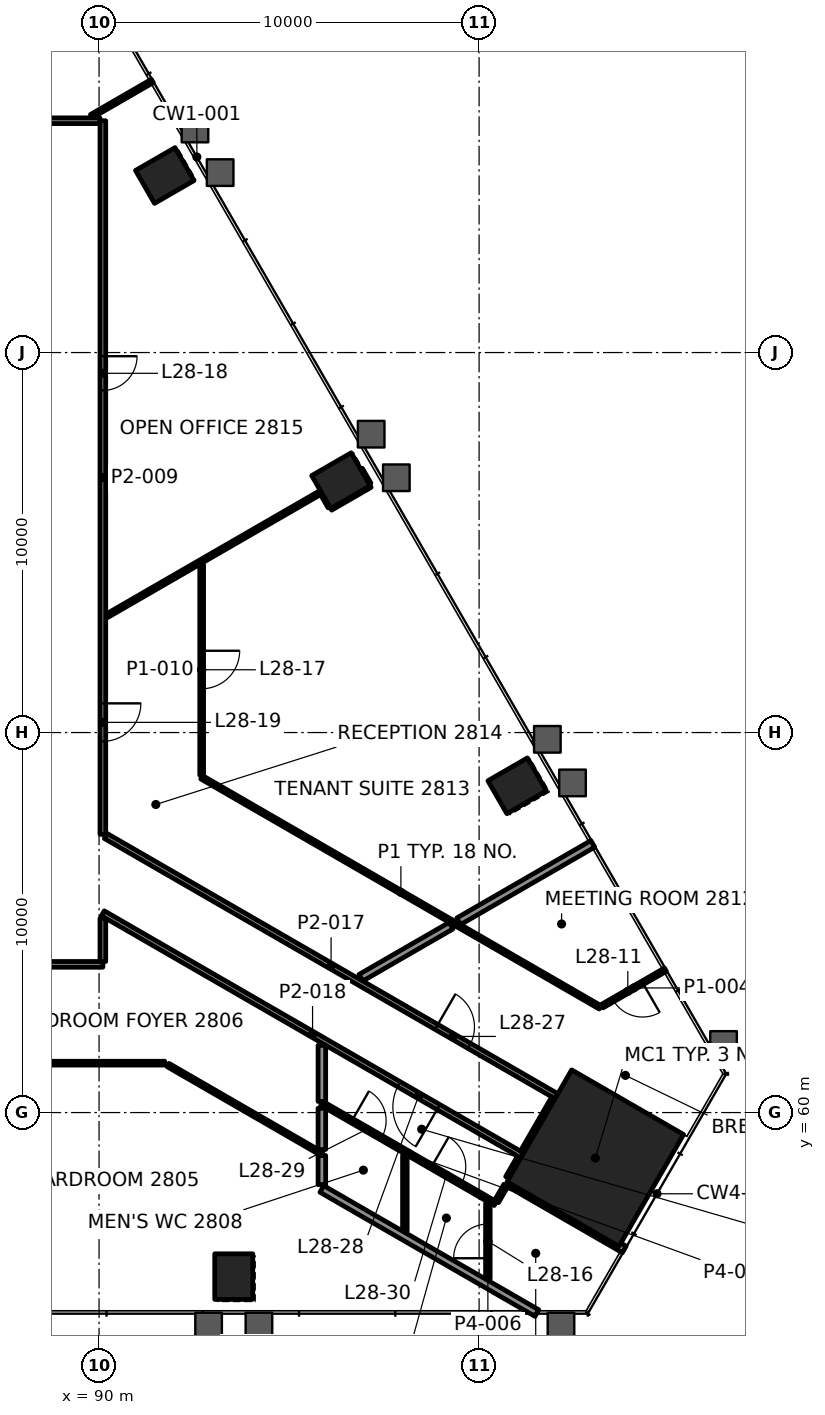
"""IFC4 building model, lengths in metres.
Left out: names, types, materials, properties, quantities, classifications, styles, units other than length and angle.
Written with IfcOpenShell. Run it as: python <this file> out.ifc"""

import sys

from ifc_helpers import new_model, si_unit, direction, frame, frame_2d, origin, origin_2d, place, context, subcontext, project, spatial, rectangle, extrude, element, fill, save


model = new_model("IFC4")
c1 = context("Model", 3, precision=1e-05, world=origin(), true_north=direction((0.0, 1.0)))
c2 = subcontext(c1, "Body", "Model", "MODEL_VIEW")
j1 = project(units=[si_unit("LENGTHUNIT", "METRE"), si_unit("PLANEANGLEUNIT", "RADIAN")], contexts=[c1])
p1 = place(None, origin())
s1 = spatial("IfcSite", under=j1, at=p1, CompositionType="ELEMENT")
p2 = place(p1, origin())
s2 = spatial("IfcBuilding", under=s1, at=p2, CompositionType="ELEMENT")
p3 = place(p2, frame((0.0, 0.0, 124.0)))
s3 = spatial("IfcBuildingStorey", under=s2, at=p3, CompositionType="ELEMENT", Elevation=124.0)
p4 = place(p3, frame((103.058, 58.801, 0.0), z_axis=(0.0, 0.0, 1.0), x_axis=(0.5, 0.866025403784, 0.0)))
e1 = element("IfcColumn", 1, at=p4, inside=s3, PredefinedType="COLUMN", context=c2, shape_type="SweptSolid", body=[
    extrude(rectangle(XDim=3.4, YDim=3.4, at=origin_2d()), origin(), (0.0, 0.0, 1.0), 4.2),
])
for number, where, z_axis, x_axis in (
    (2, (93.545, 55.683, -0.0), (0.0, 0.0, 1.0), (1.0, 0.0, 0.0)),
    (3, (101.001, 68.598, -0.0), (0.0, 0.0, 1.0), (-0.5, 0.866, 0.0)),
    (4, (96.365, 76.628, -0.0), (0.0, 0.0, 1.0), (-0.5, 0.866, 0.0)),
    (5, (91.729, 84.658, -0.0), (0.0, 0.0, 1.0), (-0.5, 0.866, 0.0)),
):
    element("IfcColumn", number, at=place(p3, frame(where, z_axis=z_axis, x_axis=x_axis)), inside=s3, PredefinedType="COLUMN", context=c2, shape_type="SweptSolid", body=[
        extrude(rectangle(XDim=1.0, YDim=1.2, at=origin_2d()), origin(), (0.0, 0.0, 1.0), 4.2),
    ])
p5 = place(p3, frame((63.41, 61.3, 0.0), z_axis=(0.0, 0.0, 1.0), x_axis=(1.0, 0.0, 0.0)))
e6 = element("IfcWall", 6, at=p5, inside=s3, PredefinedType="PARTITIONING", context=c2, shape_type="SweptSolid", body=[
    extrude(rectangle(XDim=28.319, YDim=0.1, at=frame_2d((14.16, 0.0))), origin(), (0.0, 0.0, 1.0), 3.4),
])
p6 = place(p5, frame((7.613, 0.0, 0.0)))
e7 = element("IfcOpeningElement", 7, at=p6, cuts=e6, PredefinedType="OPENING", context=c2, shape_type="SweptSolid", body=[
    extrude(rectangle(XDim=1.2, YDim=2.1, at=frame_2d((0.6, 1.05))), frame((0.0, 0.06, 0.0), z_axis=(0.0, -1.0, 0.0), x_axis=(1.0, 0.0, 0.0)), (0.0, 0.0, 1.0), 0.12),
])
p7 = place(p5, frame((21.573, 0.0, 0.0)))
e8 = element("IfcOpeningElement", 8, at=p7, cuts=e6, PredefinedType="OPENING", context=c2, shape_type="SweptSolid", body=[
    extrude(rectangle(XDim=1.2, YDim=2.1, at=frame_2d((0.6, 1.05))), frame((0.0, 0.06, 0.0), z_axis=(0.0, -1.0, 0.0), x_axis=(1.0, 0.0, 0.0)), (0.0, 0.0, 1.0), 0.12),
])
p8 = place(p3, frame((90.1, 63.9, 0.0), z_axis=(0.0, 0.0, 1.0), x_axis=(-1.0, 0.0, 0.0)))
e9 = element("IfcWall", 9, at=p8, inside=s3, PredefinedType="PARTITIONING", context=c2, shape_type="SweptSolid", body=[
    extrude(rectangle(XDim=30.2, YDim=0.15, at=frame_2d((15.1, 0.0))), origin(), (0.0, 0.0, 1.0), 3.4),
])
p9 = place(p8, frame((4.833, 0.0, 0.0)))
e10 = element("IfcOpeningElement", 10, at=p9, cuts=e9, PredefinedType="OPENING", context=c2, shape_type="SweptSolid", body=[
    extrude(rectangle(XDim=1.0, YDim=2.1, at=frame_2d((0.5, 1.05))), frame((0.0, 0.085, 0.0), z_axis=(0.0, -1.0, 0.0), x_axis=(1.0, 0.0, 0.0)), (0.0, 0.0, 1.0), 0.17),
])
p10 = place(p8, frame((18.077, 0.0, 0.0)))
e11 = element("IfcOpeningElement", 11, at=p10, cuts=e9, PredefinedType="OPENING", context=c2, shape_type="SweptSolid", body=[
    extrude(rectangle(XDim=1.0, YDim=2.1, at=frame_2d((0.5, 1.05))), frame((0.0, 0.085, 0.0), z_axis=(0.0, -1.0, 0.0), x_axis=(1.0, 0.0, 0.0)), (0.0, 0.0, 1.0), 0.17),
])
p11 = place(p8, frame((27.893, 0.0, 0.0)))
e12 = element("IfcOpeningElement", 12, at=p11, cuts=e9, PredefinedType="OPENING", context=c2, shape_type="SweptSolid", body=[
    extrude(rectangle(XDim=0.9, YDim=2.1, at=frame_2d((0.45, 1.05))), frame((0.0, 0.085, 0.0), z_axis=(0.0, -1.0, 0.0), x_axis=(1.0, 0.0, 0.0)), (0.0, 0.0, 1.0), 0.17),
])
p12 = place(p3, frame((80.375, 86.1, 0.0), z_axis=(0.0, 0.0, 1.0), x_axis=(1.0, 0.0, 0.0)))
e13 = element("IfcWall", 13, at=p12, inside=s3, PredefinedType="PARTITIONING", context=c2, shape_type="SweptSolid", body=[
    extrude(rectangle(XDim=9.649, YDim=0.15, at=frame_2d((4.825, 0.0))), origin(), (0.0, 0.0, 1.0), 3.4),
])
p13 = place(p12, frame((4.11, 0.0, 0.0)))
e14 = element("IfcOpeningElement", 14, at=p13, cuts=e13, PredefinedType="OPENING", context=c2, shape_type="SweptSolid", body=[
    extrude(rectangle(XDim=1.2, YDim=2.1, at=frame_2d((0.6, 1.05))), frame((0.0, 0.085, 0.0), z_axis=(0.0, -1.0, 0.0), x_axis=(1.0, 0.0, 0.0)), (0.0, 0.0, 1.0), 0.17),
])
p14 = place(p3, frame((104.903, 63.761, 0.0), z_axis=(0.0, 0.0, 1.0), x_axis=(-0.86605048973, -0.49995654735, 0.0)))
e15 = element("IfcWall", 15, at=p14, inside=s3, PredefinedType="PARTITIONING", context=c2, shape_type="SweptSolid", body=[
    extrude(rectangle(XDim=1.926, YDim=0.1, at=frame_2d((0.963, 0.0))), origin(), (0.0, 0.0, 1.0), 3.4),
])
p15 = place(p14, frame((0.693, 0.0, 0.0)))
e16 = element("IfcOpeningElement", 16, at=p15, cuts=e15, PredefinedType="OPENING", context=c2, shape_type="SweptSolid", body=[
    extrude(rectangle(XDim=0.9, YDim=2.1, at=frame_2d((0.45, 1.05))), frame((0.0, 0.06, 0.0), z_axis=(0.0, -1.0, 0.0), x_axis=(1.0, 0.0, 0.0)), (0.0, 0.0, 1.0), 0.12),
])
p16 = place(p3, frame((96.89, 63.548, 0.0), z_axis=(0.0, 0.0, 1.0), x_axis=(0.86604168154, 0.499971805041, 0.0)))
e17 = element("IfcWall", 17, at=p16, inside=s3, PredefinedType="PARTITIONING", context=c2, shape_type="SweptSolid", body=[
    extrude(rectangle(XDim=2.74, YDim=0.2, at=frame_2d((1.37, 0.0))), origin(), (0.0, 0.0, 1.0), 3.4),
])
p17 = place(p3, frame((96.096, 75.896, 0.0), z_axis=(0.0, 0.0, 1.0), x_axis=(0.865978732077, 0.500080829057, 0.0)))
e18 = element("IfcWall", 18, at=p17, inside=s3, PredefinedType="PARTITIONING", context=c2, shape_type="SweptSolid", body=[
    extrude(rectangle(XDim=1.199, YDim=0.1, at=frame_2d((0.6, 0.0))), origin(), (0.0, 0.0, 1.0), 3.165),
])
p18 = place(p3, frame((90.201, 73.07, 0.0), z_axis=(0.0, 0.0, 1.0), x_axis=(0.866021525041, 0.500006718121, 0.0)))
e19 = element("IfcWall", 19, at=p18, inside=s3, PredefinedType="PARTITIONING", context=c2, shape_type="SweptSolid", body=[
    extrude(rectangle(XDim=6.518, YDim=0.1, at=frame_2d((3.259, 0.0))), origin(), (0.0, 0.0, 1.0), 3.4),
])
p19 = place(p3, frame((89.797, 86.22, 0.0), z_axis=(0.0, 0.0, 1.0), x_axis=(0.866036320872, 0.499981090573, 0.0)))
e20 = element("IfcWall", 20, at=p19, inside=s3, PredefinedType="PARTITIONING", context=c2, shape_type="SweptSolid", body=[
    extrude(rectangle(XDim=1.852, YDim=0.1, at=frame_2d((0.926, 0.0))), origin(), (0.0, 0.0, 1.0), 3.165),
])
p20 = place(p3, frame((100.458, 57.658, 0.0), z_axis=(0.0, 0.0, 1.0), x_axis=(0.499895202697, 0.866085900082, 0.0)))
e21 = element("IfcWall", 21, at=p20, inside=s3, PredefinedType="PARTITIONING", context=c2, shape_type="SweptSolid", body=[
    extrude(rectangle(XDim=0.489, YDim=0.12, at=frame_2d((0.245, 0.0))), origin(), (0.0, 0.0, 1.0), 3.4),
])
p21 = place(p3, frame((100.786, 58.265, 0.0), z_axis=(0.0, 0.0, 1.0), x_axis=(0.499880341542, 0.866094477606, 0.0)))
e22 = element("IfcWall", 22, at=p21, inside=s3, PredefinedType="PARTITIONING", context=c2, shape_type="SweptSolid", body=[
    extrude(rectangle(XDim=0.625, YDim=0.2, at=frame_2d((0.312, 0.0))), origin(), (0.0, 0.0, 1.0), 3.4),
])
p22 = place(p3, frame((100.231, 55.623, 0.0), z_axis=(0.0, 0.0, 1.0), x_axis=(0.0, 1.0, 0.0)))
e23 = element("IfcWall", 23, at=p22, inside=s3, PredefinedType="PARTITIONING", context=c2, shape_type="SweptSolid", body=[
    extrude(rectangle(XDim=1.987, YDim=0.12, at=frame_2d((0.993, 0.0))), origin(), (0.0, 0.0, 1.0), 3.4),
])
p23 = place(p22, frame((0.543, 0.0, 0.0)))
e24 = element("IfcOpeningElement", 24, at=p23, cuts=e23, PredefinedType="OPENING", context=c2, shape_type="SweptSolid", body=[
    extrude(rectangle(XDim=0.9, YDim=2.1, at=frame_2d((0.45, 1.05))), frame((0.0, 0.07, 0.0), z_axis=(0.0, -1.0, 0.0), x_axis=(1.0, 0.0, 0.0)), (0.0, 0.0, 1.0), 0.14),
])
p24 = place(p3, frame((98.047, 56.884, 0.0), z_axis=(0.0, 0.0, 1.0), x_axis=(0.0, 1.0, 0.0)))
e25 = element("IfcWall", 25, at=p24, inside=s3, PredefinedType="PARTITIONING", context=c2, shape_type="SweptSolid", body=[
    extrude(rectangle(XDim=1.987, YDim=0.12, at=frame_2d((0.993, 0.0))), origin(), (0.0, 0.0, 1.0), 3.4),
])
p25 = place(p3, frame((95.863, 58.105, 0.0), z_axis=(0.0, 0.0, 1.0), x_axis=(0.0, 1.0, 0.0)))
e26 = element("IfcWall", 26, at=p25, inside=s3, PredefinedType="PARTITIONING", context=c2, shape_type="SweptSolid", body=[
    extrude(rectangle(XDim=0.765, YDim=0.2, at=frame_2d((0.383, 0.0))), origin(), (0.0, 0.0, 1.0), 3.4),
])
p26 = place(p3, frame((92.7, 74.425, 0.0), z_axis=(0.0, 0.0, 1.0), x_axis=(0.0, -1.0, 0.0)))
e27 = element("IfcWall", 27, at=p26, inside=s3, PredefinedType="PARTITIONING", context=c2, shape_type="SweptSolid", body=[
    extrude(rectangle(XDim=5.544, YDim=0.1, at=frame_2d((2.772, 0.0))), origin(), (0.0, 0.0, 1.0), 3.4),
])
p27 = place(p26, frame((2.272, 0.0, 0.0)))
e28 = element("IfcOpeningElement", 28, at=p27, cuts=e27, PredefinedType="OPENING", context=c2, shape_type="SweptSolid", body=[
    extrude(rectangle(XDim=1.0, YDim=2.1, at=frame_2d((0.5, 1.05))), frame((0.0, 0.06, 0.0), z_axis=(0.0, -1.0, 0.0), x_axis=(1.0, 0.0, 0.0)), (0.0, 0.0, 1.0), 0.12),
])
p28 = place(p3, frame((90.1, 63.975, 0.0), z_axis=(0.0, 0.0, 1.0), x_axis=(0.0, 1.0, 0.0)))
e29 = element("IfcWall", 29, at=p28, inside=s3, PredefinedType="PARTITIONING", context=c2, shape_type="SweptSolid", body=[
    extrude(rectangle(XDim=1.131, YDim=0.15, at=frame_2d((0.565, 0.0))), origin(), (0.0, 0.0, 1.0), 3.247),
])
p29 = place(p3, frame((90.1, 86.1, 0.0), z_axis=(0.0, 0.0, 1.0), x_axis=(0.0, -1.0, 0.0)))
e30 = element("IfcWall", 30, at=p29, inside=s3, PredefinedType="PARTITIONING", context=c2, shape_type="SweptSolid", body=[
    extrude(rectangle(XDim=18.778, YDim=0.15, at=frame_2d((9.389, 0.0))), origin(), (0.0, 0.0, 1.0), 3.4),
])
p30 = place(p29, frame((6.196, 0.0, 0.0)))
e31 = element("IfcOpeningElement", 31, at=p30, cuts=e30, PredefinedType="OPENING", context=c2, shape_type="SweptSolid", body=[
    extrude(rectangle(XDim=0.9, YDim=2.1, at=frame_2d((0.45, 1.05))), frame((0.0, 0.085, 0.0), z_axis=(0.0, -1.0, 0.0), x_axis=(1.0, 0.0, 0.0)), (0.0, 0.0, 1.0), 0.17),
])
p31 = place(p29, frame((15.332, 0.0, 0.0)))
e32 = element("IfcOpeningElement", 32, at=p31, cuts=e30, PredefinedType="OPENING", context=c2, shape_type="SweptSolid", body=[
    extrude(rectangle(XDim=1.0, YDim=2.1, at=frame_2d((0.5, 1.05))), frame((0.0, 0.085, 0.0), z_axis=(0.0, -1.0, 0.0), x_axis=(1.0, 0.0, 0.0)), (0.0, 0.0, 1.0), 0.17),
])
p32 = place(p3, frame((97.11, 76.539, 0.0), z_axis=(0.0, 0.0, 1.0), x_axis=(-0.500286647819, 0.865859844325, 0.0)))
e33 = element("IfcWall", 33, at=p32, inside=s3, PredefinedType="PARTITIONING", context=c2, shape_type="SweptSolid", body=[
    extrude(rectangle(XDim=0.449, YDim=0.1, at=frame_2d((0.225, 0.0))), origin(), (0.0, 0.0, 1.0), 3.4),
])
p33 = place(p3, frame((96.07, 75.939, 0.0), z_axis=(0.0, 0.0, 1.0), x_axis=(-0.50002266109, 0.866012320003, 0.0)))
e34 = element("IfcWall", 34, at=p33, inside=s3, PredefinedType="PARTITIONING", context=c2, shape_type="SweptSolid", body=[
    extrude(rectangle(XDim=0.399, YDim=0.1, at=frame_2d((0.199, 0.0))), origin(), (0.0, 0.0, 1.0), 3.4),
])
p34 = place(p3, frame((103.185, 62.769, 0.0), z_axis=(0.0, 0.0, 1.0), x_axis=(-0.866024396652, 0.5000017444, 0.0)))
e35 = element("IfcWall", 35, at=p34, inside=s3, PredefinedType="PARTITIONING", context=c2, shape_type="SweptSolid", body=[
    extrude(rectangle(XDim=12.107, YDim=0.1, at=frame_2d((6.053, 0.0))), origin(), (0.0, 0.0, 1.0), 3.4),
])
p35 = place(p3, frame((90.175, 67.278, 0.0), z_axis=(0.0, 0.0, 1.0), x_axis=(0.866022903348, -0.500004330858, 0.0)))
e36 = element("IfcWall", 36, at=p35, inside=s3, PredefinedType="PARTITIONING", context=c2, shape_type="SweptSolid", body=[
    extrude(rectangle(XDim=13.695, YDim=0.15, at=frame_2d((6.848, 0.0))), origin(), (0.0, 0.0, 1.0), 3.4),
])
p36 = place(p35, frame((10.05, 0.0, 0.0)))
e37 = element("IfcOpeningElement", 37, at=p36, cuts=e36, PredefinedType="OPENING", context=c2, shape_type="SweptSolid", body=[
    extrude(rectangle(XDim=1.0, YDim=2.1, at=frame_2d((0.5, 1.05))), frame((0.0, 0.085, 0.0), z_axis=(0.0, -1.0, 0.0), x_axis=(1.0, 0.0, 0.0)), (0.0, 0.0, 1.0), 0.17),
])
p37 = place(p3, frame((101.136, 58.871, 0.0), z_axis=(0.0, 0.0, 1.0), x_axis=(-0.866020317169, 0.500008810174, 0.0)))
e38 = element("IfcWall", 38, at=p37, inside=s3, PredefinedType="PARTITIONING", context=c2, shape_type="SweptSolid", body=[
    extrude(rectangle(XDim=12.743, YDim=0.15, at=frame_2d((6.372, 0.0))), origin(), (0.0, 0.0, 1.0), 3.247),
])
p38 = place(p37, frame((2.546, 0.0, 0.0)))
e39 = element("IfcOpeningElement", 39, at=p38, cuts=e38, PredefinedType="OPENING", context=c2, shape_type="SweptSolid", body=[
    extrude(rectangle(XDim=1.2, YDim=2.1, at=frame_2d((0.6, 1.05))), frame((0.0, 0.085, 0.0), z_axis=(0.0, -1.0, 0.0), x_axis=(1.0, 0.0, 0.0)), (0.0, 0.0, 1.0), 0.17),
])
p39 = place(p3, frame((103.819, 56.398, 0.0), z_axis=(0.0, 0.0, 1.0), x_axis=(-0.866004308173, 0.500036536891, 0.0)))
e40 = element("IfcWall", 40, at=p39, inside=s3, PredefinedType="PARTITIONING", context=c2, shape_type="SweptSolid", body=[
    extrude(rectangle(XDim=3.544, YDim=0.2, at=frame_2d((1.772, 0.0))), origin(), (0.0, 0.0, 1.0), 3.4),
])
p40 = place(p3, frame((95.863, 60.241, 0.0), z_axis=(0.0, 0.0, 1.0), x_axis=(0.866028224559, -0.499995114243, 0.0)))
e41 = element("IfcWall", 41, at=p40, inside=s3, PredefinedType="PARTITIONING", context=c2, shape_type="SweptSolid", body=[
    extrude(rectangle(XDim=5.271, YDim=0.12, at=frame_2d((2.635, 0.0))), origin(), (0.0, 0.0, 1.0), 3.4),
])
p41 = place(p40, frame((0.913, 0.0, 0.0)))
e42 = element("IfcOpeningElement", 42, at=p41, cuts=e41, PredefinedType="OPENING", context=c2, shape_type="SweptSolid", body=[
    extrude(rectangle(XDim=0.9, YDim=2.1, at=frame_2d((0.45, 1.05))), frame((0.0, 0.07, 0.0), z_axis=(0.0, -1.0, 0.0), x_axis=(1.0, 0.0, 0.0)), (0.0, 0.0, 1.0), 0.14),
])
p42 = place(p40, frame((3.333, 0.0, 0.0)))
e43 = element("IfcOpeningElement", 43, at=p42, cuts=e41, PredefinedType="OPENING", context=c2, shape_type="SweptSolid", body=[
    extrude(rectangle(XDim=0.9, YDim=2.1, at=frame_2d((0.45, 1.05))), frame((0.0, 0.07, 0.0), z_axis=(0.0, -1.0, 0.0), x_axis=(1.0, 0.0, 0.0)), (0.0, 0.0, 1.0), 0.14),
])
p43 = place(p3, frame((95.863, 58.914, 0.0), z_axis=(0.0, 0.0, 1.0), x_axis=(-0.866042039906, 0.499971184285, 0.0)))
e44 = element("IfcWall", 44, at=p43, inside=s3, PredefinedType="PARTITIONING", context=c2, shape_type="SweptSolid", body=[
    extrude(rectangle(XDim=4.673, YDim=0.1, at=frame_2d((2.336, 0.0))), origin(), (0.0, 0.0, 1.0), 3.4),
])
p44 = place(p3, frame((101.521, 54.723, 0.0), z_axis=(0.0, 0.0, 1.0), x_axis=(-0.866020061583, 0.50000925285, 0.0)))
e45 = element("IfcWall", 45, at=p44, inside=s3, PredefinedType="PARTITIONING", context=c2, shape_type="SweptSolid", body=[
    extrude(rectangle(XDim=6.534, YDim=0.2, at=frame_2d((3.267, 0.0))), origin(), (0.0, 0.0, 1.0), 3.4),
])
p45 = place(p3, frame((99.463, 65.033, 0.0), z_axis=(0.0, 0.0, 1.0), x_axis=(0.866014978466, 0.500018056747, 0.0)))
e46 = element("IfcWall", 46, at=p45, inside=s3, PredefinedType="PARTITIONING", context=c2, shape_type="SweptSolid", body=[
    extrude(rectangle(XDim=4.075, YDim=0.2, at=frame_2d((2.038, 0.0))), origin(), (0.0, 0.0, 1.0), 3.4),
])
p46 = place(p3, frame((101.174, 58.936, 0.0), z_axis=(0.0, 0.0, 1.0), x_axis=(0.499991515992, 0.866030301974, 0.0)))
e47 = element("IfcWall", 47, at=p46, inside=s3, PredefinedType="PARTITIONING", context=c2, shape_type="SweptSolid", body=[
    extrude(rectangle(XDim=1.649, YDim=0.2, at=frame_2d((0.825, 0.0))), origin(), (0.0, 0.0, 1.0), 3.247),
])
p47 = place(p3, frame((95.863, 60.293, 0.0), z_axis=(0.0, 0.0, 1.0), x_axis=(0.0, 1.0, 0.0)))
e48 = element("IfcWall", 48, at=p47, inside=s3, PredefinedType="PARTITIONING", context=c2, shape_type="SweptSolid", body=[
    extrude(rectangle(XDim=1.476, YDim=0.2, at=frame_2d((0.738, 0.0))), origin(), (0.0, 0.0, 1.0), 3.4),
])
p48 = place(p3, frame((95.863, 59.029, 0.0), z_axis=(0.0, 0.0, 1.0), x_axis=(0.0, 1.0, 0.0)))
e49 = element("IfcWall", 49, at=p48, inside=s3, PredefinedType="PARTITIONING", context=c2, shape_type="SweptSolid", body=[
    extrude(rectangle(XDim=1.085, YDim=0.2, at=frame_2d((0.543, 0.0))), origin(), (0.0, 0.0, 1.0), 3.4),
])
p49 = place(p15, origin())
e50 = element("IfcDoor", 50, at=p49, inside=s3, OperationType="SINGLE_SWING_RIGHT", PredefinedType="DOOR", context=c2, shape_type="SweptSolid", body=[
    extrude(rectangle(XDim=0.9, YDim=2.1, at=frame_2d((0.45, 1.05))), frame((0.0, 0.025, 0.0), z_axis=(0.0, -1.0, 0.0), x_axis=(1.0, 0.0, 0.0)), (0.0, 0.0, 1.0), 0.05),
])
fill(e16, e50)
p50 = place(p23, origin())
e51 = element("IfcDoor", 51, at=p50, inside=s3, OperationType="SINGLE_SWING_LEFT", PredefinedType="DOOR", context=c2, shape_type="SweptSolid", body=[
    extrude(rectangle(XDim=0.9, YDim=2.1, at=frame_2d((0.45, 1.05))), frame((0.0, 0.025, 0.0), z_axis=(0.0, -1.0, 0.0), x_axis=(1.0, 0.0, 0.0)), (0.0, 0.0, 1.0), 0.05),
])
fill(e24, e51)
p51 = place(p27, origin())
e52 = element("IfcDoor", 52, at=p51, inside=s3, OperationType="SINGLE_SWING_LEFT", PredefinedType="DOOR", context=c2, shape_type="SweptSolid", body=[
    extrude(rectangle(XDim=1.0, YDim=2.1, at=frame_2d((0.5, 1.05))), frame((0.0, 0.025, 0.0), z_axis=(0.0, -1.0, 0.0), x_axis=(1.0, 0.0, 0.0)), (0.0, 0.0, 1.0), 0.05),
])
fill(e28, e52)
p52 = place(p30, origin())
e53 = element("IfcDoor", 53, at=p52, inside=s3, OperationType="SINGLE_SWING_LEFT", PredefinedType="DOOR", context=c2, shape_type="SweptSolid", body=[
    extrude(rectangle(XDim=0.9, YDim=2.1, at=frame_2d((0.45, 1.05))), frame((0.0, 0.025, 0.0), z_axis=(0.0, -1.0, 0.0), x_axis=(1.0, 0.0, 0.0)), (0.0, 0.0, 1.0), 0.05),
])
fill(e31, e53)
p53 = place(p31, origin())
e54 = element("IfcDoor", 54, at=p53, inside=s3, OperationType="SINGLE_SWING_RIGHT", PredefinedType="DOOR", context=c2, shape_type="SweptSolid", body=[
    extrude(rectangle(XDim=1.0, YDim=2.1, at=frame_2d((0.5, 1.05))), frame((0.0, 0.025, 0.0), z_axis=(0.0, -1.0, 0.0), x_axis=(1.0, 0.0, 0.0)), (0.0, 0.0, 1.0), 0.05),
])
fill(e32, e54)
p54 = place(p36, origin())
e55 = element("IfcDoor", 55, at=p54, inside=s3, OperationType="SINGLE_SWING_LEFT", PredefinedType="DOOR", context=c2, shape_type="SweptSolid", body=[
    extrude(rectangle(XDim=1.0, YDim=2.1, at=frame_2d((0.5, 1.05))), frame((0.0, 0.025, 0.0), z_axis=(0.0, -1.0, 0.0), x_axis=(1.0, 0.0, 0.0)), (0.0, 0.0, 1.0), 0.05),
])
fill(e37, e55)
p55 = place(p38, origin())
e56 = element("IfcDoor", 56, at=p55, inside=s3, OperationType="DOUBLE_DOOR_SINGLE_SWING", PredefinedType="DOOR", context=c2, shape_type="SweptSolid", body=[
    extrude(rectangle(XDim=1.2, YDim=2.1, at=frame_2d((0.6, 1.05))), frame((0.0, 0.025, 0.0), z_axis=(0.0, -1.0, 0.0), x_axis=(1.0, 0.0, 0.0)), (0.0, 0.0, 1.0), 0.05),
])
fill(e39, e56)
p56 = place(p41, origin())
e57 = element("IfcDoor", 57, at=p56, inside=s3, OperationType="SINGLE_SWING_RIGHT", PredefinedType="DOOR", context=c2, shape_type="SweptSolid", body=[
    extrude(rectangle(XDim=0.9, YDim=2.1, at=frame_2d((0.45, 1.05))), frame((0.0, 0.025, 0.0), z_axis=(0.0, -1.0, 0.0), x_axis=(1.0, 0.0, 0.0)), (0.0, 0.0, 1.0), 0.05),
])
fill(e42, e57)
p57 = place(p42, origin())
e58 = element("IfcDoor", 58, at=p57, inside=s3, OperationType="SINGLE_SWING_LEFT", PredefinedType="DOOR", context=c2, shape_type="SweptSolid", body=[
    extrude(rectangle(XDim=0.9, YDim=2.1, at=frame_2d((0.45, 1.05))), frame((0.0, 0.025, 0.0), z_axis=(0.0, -1.0, 0.0), x_axis=(1.0, 0.0, 0.0)), (0.0, 0.0, 1.0), 0.05),
])
fill(e43, e58)
save(model, sys.argv[1])
